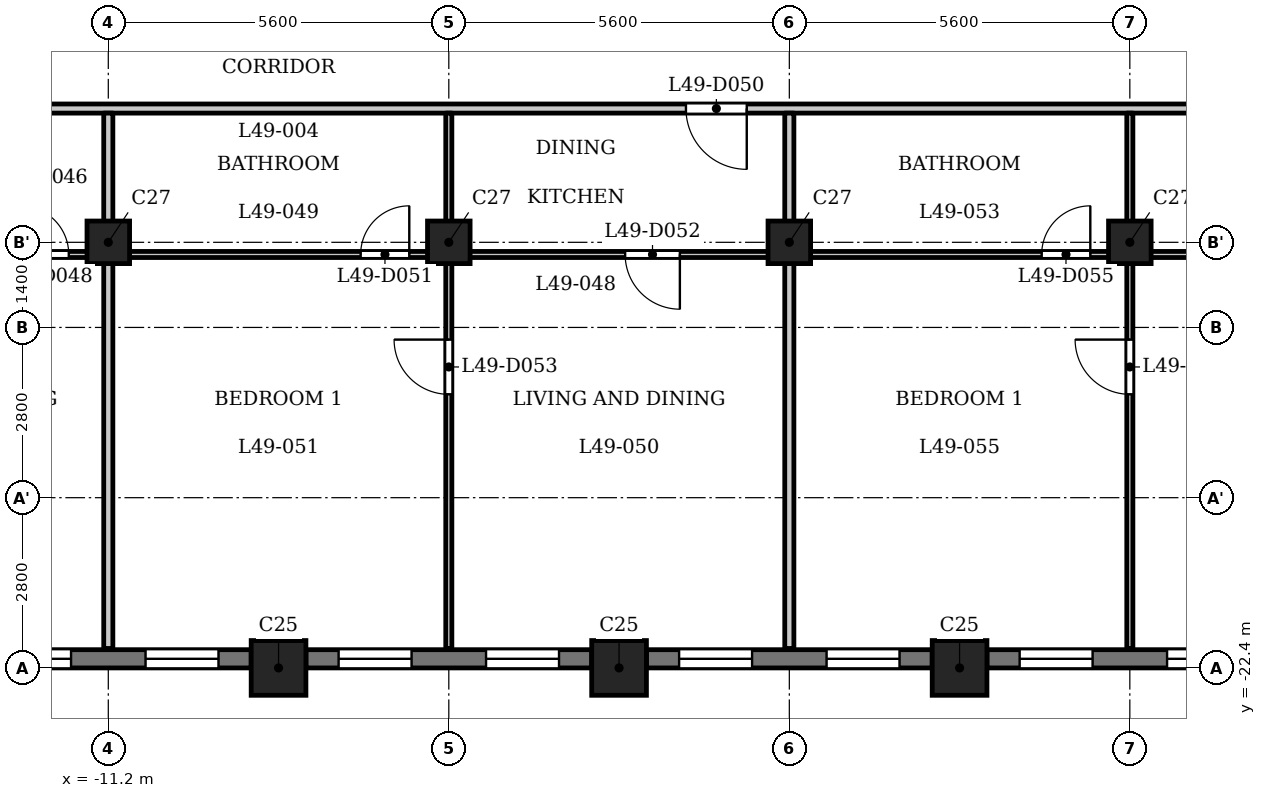
"""IFC4 building model, lengths in metres.
Left out: names, types, materials, properties, quantities, classifications, styles, units other than length and angle.
Written with IfcOpenShell. Run it as: python <this file> out.ifc"""

import sys

from ifc_helpers import new_model, si_unit, direction, frame, frame_2d, origin, origin_2d, place, context, subcontext, project, spatial, rectangle, extrude, element, fill, save


model = new_model("IFC4")
c1 = context("Model", 3, precision=1e-05, world=origin(), true_north=direction((0.0, 1.0)))
c2 = subcontext(c1, "Body", "Model", "MODEL_VIEW")
j1 = project(units=[si_unit("LENGTHUNIT", "METRE"), si_unit("PLANEANGLEUNIT", "RADIAN")], contexts=[c1])
p1 = place(None, origin())
s1 = spatial("IfcSite", under=j1, at=p1, CompositionType="ELEMENT")
p2 = place(p1, origin())
s2 = spatial("IfcBuilding", under=s1, at=p2, CompositionType="ELEMENT")
p3 = place(p2, frame((0.0, 0.0, 192.4)))
s3 = spatial("IfcBuildingStorey", under=s2, at=p3, CompositionType="ELEMENT", Elevation=192.4)
for number, where, z_axis, x_axis in (
    (1, (-8.4, -22.4, 0.0), (0.0, 0.0, 1.0), (1.0, 0.0, 0.0)),
    (2, (-2.8, -22.4, 0.0), (0.0, 0.0, 1.0), (1.0, 0.0, 0.0)),
    (3, (2.8, -22.4, 0.0), (0.0, 0.0, 1.0), (1.0, 0.0, 0.0)),
):
    element("IfcColumn", number, at=place(p3, frame(where, z_axis=z_axis, x_axis=x_axis)), inside=s3, PredefinedType="COLUMN", context=c2, shape_type="SweptSolid", body=[
        extrude(rectangle(XDim=0.9, YDim=0.9, at=origin_2d()), origin(), (0.0, 0.0, 1.0), 3.5),
    ])
for number, where, z_axis, x_axis in (
    (4, (-11.2, -15.4, 0.0), (0.0, 0.0, 1.0), (1.0, 0.0, 0.0)),
    (5, (-5.6, -15.4, 0.0), (0.0, 0.0, 1.0), (1.0, 0.0, 0.0)),
    (6, (0.0, -15.4, 0.0), (0.0, 0.0, 1.0), (1.0, 0.0, 0.0)),
    (7, (5.6, -15.4, 0.0), (0.0, 0.0, 1.0), (1.0, 0.0, 0.0)),
):
    element("IfcColumn", number, at=place(p3, frame(where, z_axis=z_axis, x_axis=x_axis)), inside=s3, PredefinedType="COLUMN", context=c2, shape_type="SweptSolid", body=[
        extrude(rectangle(XDim=0.7, YDim=0.7, at=origin_2d()), origin(), (0.0, 0.0, 1.0), 3.5),
    ])
p4 = place(p3, frame((-13.55, -22.25, 0.0), z_axis=(0.0, 0.0, 1.0), x_axis=(1.0, 0.0, 0.0)))
e8 = element("IfcWall", 8, at=p4, inside=s3, PredefinedType="SOLIDWALL", context=c2, shape_type="SweptSolid", body=[
    extrude(rectangle(XDim=4.7, YDim=0.3, at=frame_2d((2.35, 0.0))), origin(), (0.0, 0.0, 1.0), 2.5),
])
p5 = place(p4, frame((0.538, 0.0, 0.6)))
e9 = element("IfcOpeningElement", 9, at=p5, cuts=e8, PredefinedType="OPENING", context=c2, shape_type="SweptSolid", body=[
    extrude(rectangle(XDim=1.2, YDim=1.55, at=frame_2d((0.6, 0.775))), frame((0.0, 0.16, 0.0), z_axis=(0.0, -1.0, 0.0), x_axis=(1.0, 0.0, 0.0)), (0.0, 0.0, 1.0), 0.32),
])
p6 = place(p4, frame((2.962, 0.0, 0.6)))
e10 = element("IfcOpeningElement", 10, at=p6, cuts=e8, PredefinedType="OPENING", context=c2, shape_type="SweptSolid", body=[
    extrude(rectangle(XDim=1.2, YDim=1.55, at=frame_2d((0.6, 0.775))), frame((0.0, 0.16, 0.0), z_axis=(0.0, -1.0, 0.0), x_axis=(1.0, 0.0, 0.0)), (0.0, 0.0, 1.0), 0.32),
])
p7 = place(p3, frame((-7.95, -22.25, 0.0), z_axis=(0.0, 0.0, 1.0), x_axis=(1.0, 0.0, 0.0)))
e11 = element("IfcWall", 11, at=p7, inside=s3, PredefinedType="SOLIDWALL", context=c2, shape_type="SweptSolid", body=[
    extrude(rectangle(XDim=4.7, YDim=0.3, at=frame_2d((2.35, 0.0))), origin(), (0.0, 0.0, 1.0), 2.5),
])
p8 = place(p7, frame((0.538, 0.0, 0.6)))
e12 = element("IfcOpeningElement", 12, at=p8, cuts=e11, PredefinedType="OPENING", context=c2, shape_type="SweptSolid", body=[
    extrude(rectangle(XDim=1.2, YDim=1.55, at=frame_2d((0.6, 0.775))), frame((0.0, 0.16, 0.0), z_axis=(0.0, -1.0, 0.0), x_axis=(1.0, 0.0, 0.0)), (0.0, 0.0, 1.0), 0.32),
])
p9 = place(p7, frame((2.962, 0.0, 0.6)))
e13 = element("IfcOpeningElement", 13, at=p9, cuts=e11, PredefinedType="OPENING", context=c2, shape_type="SweptSolid", body=[
    extrude(rectangle(XDim=1.2, YDim=1.55, at=frame_2d((0.6, 0.775))), frame((0.0, 0.16, 0.0), z_axis=(0.0, -1.0, 0.0), x_axis=(1.0, 0.0, 0.0)), (0.0, 0.0, 1.0), 0.32),
])
p10 = place(p3, frame((-2.35, -22.25, 0.0), z_axis=(0.0, 0.0, 1.0), x_axis=(1.0, 0.0, 0.0)))
e14 = element("IfcWall", 14, at=p10, inside=s3, PredefinedType="SOLIDWALL", context=c2, shape_type="SweptSolid", body=[
    extrude(rectangle(XDim=4.7, YDim=0.3, at=frame_2d((2.35, 0.0))), origin(), (0.0, 0.0, 1.0), 2.5),
])
p11 = place(p10, frame((0.538, 0.0, 0.6)))
e15 = element("IfcOpeningElement", 15, at=p11, cuts=e14, PredefinedType="OPENING", context=c2, shape_type="SweptSolid", body=[
    extrude(rectangle(XDim=1.2, YDim=1.55, at=frame_2d((0.6, 0.775))), frame((0.0, 0.16, 0.0), z_axis=(0.0, -1.0, 0.0), x_axis=(1.0, 0.0, 0.0)), (0.0, 0.0, 1.0), 0.32),
])
p12 = place(p10, frame((2.962, 0.0, 0.6)))
e16 = element("IfcOpeningElement", 16, at=p12, cuts=e14, PredefinedType="OPENING", context=c2, shape_type="SweptSolid", body=[
    extrude(rectangle(XDim=1.2, YDim=1.55, at=frame_2d((0.6, 0.775))), frame((0.0, 0.16, 0.0), z_axis=(0.0, -1.0, 0.0), x_axis=(1.0, 0.0, 0.0)), (0.0, 0.0, 1.0), 0.32),
])
p13 = place(p3, frame((3.25, -22.25, 0.0), z_axis=(0.0, 0.0, 1.0), x_axis=(1.0, 0.0, 0.0)))
e17 = element("IfcWall", 17, at=p13, inside=s3, PredefinedType="SOLIDWALL", context=c2, shape_type="SweptSolid", body=[
    extrude(rectangle(XDim=4.7, YDim=0.3, at=frame_2d((2.35, 0.0))), origin(), (0.0, 0.0, 1.0), 2.5),
])
p14 = place(p13, frame((0.538, 0.0, 0.6)))
e18 = element("IfcOpeningElement", 18, at=p14, cuts=e17, PredefinedType="OPENING", context=c2, shape_type="SweptSolid", body=[
    extrude(rectangle(XDim=1.2, YDim=1.55, at=frame_2d((0.6, 0.775))), frame((0.0, 0.16, 0.0), z_axis=(0.0, -1.0, 0.0), x_axis=(1.0, 0.0, 0.0)), (0.0, 0.0, 1.0), 0.32),
])
p15 = place(p13, frame((2.962, 0.0, 0.6)))
e19 = element("IfcOpeningElement", 19, at=p15, cuts=e17, PredefinedType="OPENING", context=c2, shape_type="SweptSolid", body=[
    extrude(rectangle(XDim=1.2, YDim=1.55, at=frame_2d((0.6, 0.775))), frame((0.0, 0.16, 0.0), z_axis=(0.0, -1.0, 0.0), x_axis=(1.0, 0.0, 0.0)), (0.0, 0.0, 1.0), 0.32),
])
p16 = place(p3, frame((-16.725, -15.6, 0.0), z_axis=(0.0, 0.0, 1.0), x_axis=(1.0, 0.0, 0.0)))
e20 = element("IfcWall", 20, at=p16, inside=s3, PredefinedType="PARTITIONING", context=c2, shape_type="SweptSolid", body=[
    extrude(rectangle(XDim=33.45, YDim=0.1, at=frame_2d((16.725, 0.0))), origin(), (0.0, 0.0, 1.0), 3.2),
])
p17 = place(p16, frame((4.075, 0.0, 0.0)))
e21 = element("IfcOpeningElement", 21, at=p17, cuts=e20, PredefinedType="OPENING", context=c2, shape_type="SweptSolid", body=[
    extrude(rectangle(XDim=0.8, YDim=2.1, at=frame_2d((0.4, 1.05))), frame((0.0, 0.06, 0.0), z_axis=(0.0, -1.0, 0.0), x_axis=(1.0, 0.0, 0.0)), (0.0, 0.0, 1.0), 0.12),
])
p18 = place(p16, frame((1.825, 0.0, 0.0)))
e22 = element("IfcOpeningElement", 22, at=p18, cuts=e20, PredefinedType="OPENING", context=c2, shape_type="SweptSolid", body=[
    extrude(rectangle(XDim=0.9, YDim=2.1, at=frame_2d((0.45, 1.05))), frame((0.0, 0.06, 0.0), z_axis=(0.0, -1.0, 0.0), x_axis=(1.0, 0.0, 0.0)), (0.0, 0.0, 1.0), 0.12),
])
p19 = place(p16, frame((9.675, 0.0, 0.0)))
e23 = element("IfcOpeningElement", 23, at=p19, cuts=e20, PredefinedType="OPENING", context=c2, shape_type="SweptSolid", body=[
    extrude(rectangle(XDim=0.8, YDim=2.1, at=frame_2d((0.4, 1.05))), frame((0.0, 0.06, 0.0), z_axis=(0.0, -1.0, 0.0), x_axis=(1.0, 0.0, 0.0)), (0.0, 0.0, 1.0), 0.12),
])
p20 = place(p16, frame((14.025, 0.0, 0.0)))
e24 = element("IfcOpeningElement", 24, at=p20, cuts=e20, PredefinedType="OPENING", context=c2, shape_type="SweptSolid", body=[
    extrude(rectangle(XDim=0.9, YDim=2.1, at=frame_2d((0.45, 1.05))), frame((0.0, 0.06, 0.0), z_axis=(0.0, -1.0, 0.0), x_axis=(1.0, 0.0, 0.0)), (0.0, 0.0, 1.0), 0.12),
])
p21 = place(p16, frame((20.875, 0.0, 0.0)))
e25 = element("IfcOpeningElement", 25, at=p21, cuts=e20, PredefinedType="OPENING", context=c2, shape_type="SweptSolid", body=[
    extrude(rectangle(XDim=0.8, YDim=2.1, at=frame_2d((0.4, 1.05))), frame((0.0, 0.06, 0.0), z_axis=(0.0, -1.0, 0.0), x_axis=(1.0, 0.0, 0.0)), (0.0, 0.0, 1.0), 0.12),
])
p22 = place(p16, frame((25.225, 0.0, 0.0)))
e26 = element("IfcOpeningElement", 26, at=p22, cuts=e20, PredefinedType="OPENING", context=c2, shape_type="SweptSolid", body=[
    extrude(rectangle(XDim=0.9, YDim=2.1, at=frame_2d((0.45, 1.05))), frame((0.0, 0.06, 0.0), z_axis=(0.0, -1.0, 0.0), x_axis=(1.0, 0.0, 0.0)), (0.0, 0.0, 1.0), 0.12),
])
p23 = place(p16, frame((28.475, 0.0, 0.0)))
e27 = element("IfcOpeningElement", 27, at=p23, cuts=e20, PredefinedType="OPENING", context=c2, shape_type="SweptSolid", body=[
    extrude(rectangle(XDim=0.8, YDim=2.1, at=frame_2d((0.4, 1.05))), frame((0.0, 0.06, 0.0), z_axis=(0.0, -1.0, 0.0), x_axis=(1.0, 0.0, 0.0)), (0.0, 0.0, 1.0), 0.12),
])
p24 = place(p16, frame((30.675, 0.0, 0.0)))
e28 = element("IfcOpeningElement", 28, at=p24, cuts=e20, PredefinedType="OPENING", context=c2, shape_type="SweptSolid", body=[
    extrude(rectangle(XDim=0.9, YDim=2.1, at=frame_2d((0.45, 1.05))), frame((0.0, 0.06, 0.0), z_axis=(0.0, -1.0, 0.0), x_axis=(1.0, 0.0, 0.0)), (0.0, 0.0, 1.0), 0.12),
])
p25 = place(p3, frame((-17.4, -13.2, 0.0), z_axis=(0.0, 0.0, 1.0), x_axis=(1.0, 0.0, 0.0)))
e29 = element("IfcWall", 29, at=p25, inside=s3, PredefinedType="PARTITIONING", context=c2, shape_type="SweptSolid", body=[
    extrude(rectangle(XDim=34.8, YDim=0.15, at=frame_2d((17.4, 0.0))), origin(), (0.0, 0.0, 1.0), 3.2),
])
p26 = place(p25, frame((0.15, 0.0, 0.0)))
e30 = element("IfcOpeningElement", 30, at=p26, cuts=e29, PredefinedType="OPENING", context=c2, shape_type="SweptSolid", body=[
    extrude(rectangle(XDim=1.0, YDim=2.1, at=frame_2d((0.5, 1.05))), frame((0.0, 0.085, 0.0), z_axis=(0.0, -1.0, 0.0), x_axis=(1.0, 0.0, 0.0)), (0.0, 0.0, 1.0), 0.17),
])
p27 = place(p25, frame((33.55, 0.0, 0.0)))
e31 = element("IfcOpeningElement", 31, at=p27, cuts=e29, PredefinedType="OPENING", context=c2, shape_type="SweptSolid", body=[
    extrude(rectangle(XDim=1.0, YDim=2.1, at=frame_2d((0.5, 1.05))), frame((0.0, 0.085, 0.0), z_axis=(0.0, -1.0, 0.0), x_axis=(1.0, 0.0, 0.0)), (0.0, 0.0, 1.0), 0.17),
])
p28 = place(p25, frame((15.7, 0.0, 0.0)))
e32 = element("IfcOpeningElement", 32, at=p28, cuts=e29, PredefinedType="OPENING", context=c2, shape_type="SweptSolid", body=[
    extrude(rectangle(XDim=1.0, YDim=2.1, at=frame_2d((0.5, 1.05))), frame((0.0, 0.085, 0.0), z_axis=(0.0, -1.0, 0.0), x_axis=(1.0, 0.0, 0.0)), (0.0, 0.0, 1.0), 0.17),
])
p29 = place(p25, frame((26.9, 0.0, 0.0)))
e33 = element("IfcOpeningElement", 33, at=p29, cuts=e29, PredefinedType="OPENING", context=c2, shape_type="SweptSolid", body=[
    extrude(rectangle(XDim=1.0, YDim=2.1, at=frame_2d((0.5, 1.05))), frame((0.0, 0.085, 0.0), z_axis=(0.0, -1.0, 0.0), x_axis=(1.0, 0.0, 0.0)), (0.0, 0.0, 1.0), 0.17),
])
p30 = place(p3, frame((-11.2, -22.08, 0.0), z_axis=(0.0, 0.0, 1.0), x_axis=(0.0, 1.0, 0.0)))
e34 = element("IfcWall", 34, at=p30, inside=s3, PredefinedType="PARTITIONING", context=c2, shape_type="SweptSolid", body=[
    extrude(rectangle(XDim=6.43, YDim=0.15, at=frame_2d((3.215, 0.0))), origin(), (0.0, 0.0, 1.0), 3.2),
])
p31 = place(p3, frame((-11.2, -15.55, 0.0), z_axis=(0.0, 0.0, 1.0), x_axis=(0.0, 1.0, 0.0)))
e35 = element("IfcWall", 35, at=p31, inside=s3, PredefinedType="PARTITIONING", context=c2, shape_type="SweptSolid", body=[
    extrude(rectangle(XDim=2.275, YDim=0.15, at=frame_2d((1.138, 0.0))), origin(), (0.0, 0.0, 1.0), 3.2),
])
p32 = place(p3, frame((-5.6, -22.08, 0.0), z_axis=(0.0, 0.0, 1.0), x_axis=(0.0, 1.0, 0.0)))
e36 = element("IfcWall", 36, at=p32, inside=s3, PredefinedType="PARTITIONING", context=c2, shape_type="SweptSolid", body=[
    extrude(rectangle(XDim=6.43, YDim=0.1, at=frame_2d((3.215, 0.0))), origin(), (0.0, 0.0, 1.0), 3.2),
])
p33 = place(p32, frame((4.18, 0.0, 0.0)))
e37 = element("IfcOpeningElement", 37, at=p33, cuts=e36, PredefinedType="OPENING", context=c2, shape_type="SweptSolid", body=[
    extrude(rectangle(XDim=0.9, YDim=2.1, at=frame_2d((0.45, 1.05))), frame((0.0, 0.06, 0.0), z_axis=(0.0, -1.0, 0.0), x_axis=(1.0, 0.0, 0.0)), (0.0, 0.0, 1.0), 0.12),
])
p34 = place(p3, frame((-5.6, -15.55, 0.0), z_axis=(0.0, 0.0, 1.0), x_axis=(0.0, 1.0, 0.0)))
e38 = element("IfcWall", 38, at=p34, inside=s3, PredefinedType="PARTITIONING", context=c2, shape_type="SweptSolid", body=[
    extrude(rectangle(XDim=2.275, YDim=0.1, at=frame_2d((1.138, 0.0))), origin(), (0.0, 0.0, 1.0), 3.2),
])
p35 = place(p3, frame((0.0, -22.08, 0.0), z_axis=(0.0, 0.0, 1.0), x_axis=(0.0, 1.0, 0.0)))
e39 = element("IfcWall", 39, at=p35, inside=s3, PredefinedType="PARTITIONING", context=c2, shape_type="SweptSolid", body=[
    extrude(rectangle(XDim=6.43, YDim=0.15, at=frame_2d((3.215, 0.0))), origin(), (0.0, 0.0, 1.0), 3.2),
])
p36 = place(p3, frame((0.0, -15.55, 0.0), z_axis=(0.0, 0.0, 1.0), x_axis=(0.0, 1.0, 0.0)))
e40 = element("IfcWall", 40, at=p36, inside=s3, PredefinedType="PARTITIONING", context=c2, shape_type="SweptSolid", body=[
    extrude(rectangle(XDim=2.275, YDim=0.15, at=frame_2d((1.138, 0.0))), origin(), (0.0, 0.0, 1.0), 3.2),
])
p37 = place(p3, frame((5.6, -22.08, 0.0), z_axis=(0.0, 0.0, 1.0), x_axis=(0.0, 1.0, 0.0)))
e41 = element("IfcWall", 41, at=p37, inside=s3, PredefinedType="PARTITIONING", context=c2, shape_type="SweptSolid", body=[
    extrude(rectangle(XDim=6.43, YDim=0.1, at=frame_2d((3.215, 0.0))), origin(), (0.0, 0.0, 1.0), 3.2),
])
p38 = place(p37, frame((4.18, 0.0, 0.0)))
e42 = element("IfcOpeningElement", 42, at=p38, cuts=e41, PredefinedType="OPENING", context=c2, shape_type="SweptSolid", body=[
    extrude(rectangle(XDim=0.9, YDim=2.1, at=frame_2d((0.45, 1.05))), frame((0.0, 0.06, 0.0), z_axis=(0.0, -1.0, 0.0), x_axis=(1.0, 0.0, 0.0)), (0.0, 0.0, 1.0), 0.12),
])
p39 = place(p3, frame((5.6, -15.55, 0.0), z_axis=(0.0, 0.0, 1.0), x_axis=(0.0, 1.0, 0.0)))
e43 = element("IfcWall", 43, at=p39, inside=s3, PredefinedType="PARTITIONING", context=c2, shape_type="SweptSolid", body=[
    extrude(rectangle(XDim=2.275, YDim=0.1, at=frame_2d((1.138, 0.0))), origin(), (0.0, 0.0, 1.0), 3.2),
])
p40 = place(p17, origin())
e44 = element("IfcDoor", 44, at=p40, inside=s3, OperationType="SINGLE_SWING_RIGHT", PredefinedType="DOOR", context=c2, shape_type="SweptSolid", body=[
    extrude(rectangle(XDim=0.8, YDim=2.1, at=frame_2d((0.4, 1.05))), frame((0.0, 0.025, 0.0), z_axis=(0.0, -1.0, 0.0), x_axis=(1.0, 0.0, 0.0)), (0.0, 0.0, 1.0), 0.05),
])
fill(e21, e44)
p41 = place(p28, origin())
e45 = element("IfcDoor", 45, at=p41, inside=s3, OperationType="SINGLE_SWING_RIGHT", PredefinedType="DOOR", context=c2, shape_type="SweptSolid", body=[
    extrude(rectangle(XDim=1.0, YDim=2.1, at=frame_2d((0.5, 1.05))), frame((0.0, 0.025, 0.0), z_axis=(0.0, -1.0, 0.0), x_axis=(1.0, 0.0, 0.0)), (0.0, 0.0, 1.0), 0.05),
])
fill(e32, e45)
p42 = place(p19, origin())
e46 = element("IfcDoor", 46, at=p42, inside=s3, OperationType="SINGLE_SWING_LEFT", PredefinedType="DOOR", context=c2, shape_type="SweptSolid", body=[
    extrude(rectangle(XDim=0.8, YDim=2.1, at=frame_2d((0.4, 1.05))), frame((0.0, 0.025, 0.0), z_axis=(0.0, -1.0, 0.0), x_axis=(1.0, 0.0, 0.0)), (0.0, 0.0, 1.0), 0.05),
])
fill(e23, e46)
p43 = place(p20, origin())
e47 = element("IfcDoor", 47, at=p43, inside=s3, OperationType="SINGLE_SWING_RIGHT", PredefinedType="DOOR", context=c2, shape_type="SweptSolid", body=[
    extrude(rectangle(XDim=0.9, YDim=2.1, at=frame_2d((0.45, 1.05))), frame((0.0, 0.025, 0.0), z_axis=(0.0, -1.0, 0.0), x_axis=(1.0, 0.0, 0.0)), (0.0, 0.0, 1.0), 0.05),
])
fill(e24, e47)
p44 = place(p33, origin())
e48 = element("IfcDoor", 48, at=p44, inside=s3, OperationType="SINGLE_SWING_LEFT", PredefinedType="DOOR", context=c2, shape_type="SweptSolid", body=[
    extrude(rectangle(XDim=0.9, YDim=2.1, at=frame_2d((0.45, 1.05))), frame((0.0, 0.025, 0.0), z_axis=(0.0, -1.0, 0.0), x_axis=(1.0, 0.0, 0.0)), (0.0, 0.0, 1.0), 0.05),
])
fill(e37, e48)
p45 = place(p21, origin())
e49 = element("IfcDoor", 49, at=p45, inside=s3, OperationType="SINGLE_SWING_LEFT", PredefinedType="DOOR", context=c2, shape_type="SweptSolid", body=[
    extrude(rectangle(XDim=0.8, YDim=2.1, at=frame_2d((0.4, 1.05))), frame((0.0, 0.025, 0.0), z_axis=(0.0, -1.0, 0.0), x_axis=(1.0, 0.0, 0.0)), (0.0, 0.0, 1.0), 0.05),
])
fill(e25, e49)
p46 = place(p38, origin())
e50 = element("IfcDoor", 50, at=p46, inside=s3, OperationType="SINGLE_SWING_LEFT", PredefinedType="DOOR", context=c2, shape_type="SweptSolid", body=[
    extrude(rectangle(XDim=0.9, YDim=2.1, at=frame_2d((0.45, 1.05))), frame((0.0, 0.025, 0.0), z_axis=(0.0, -1.0, 0.0), x_axis=(1.0, 0.0, 0.0)), (0.0, 0.0, 1.0), 0.05),
])
fill(e42, e50)
p47 = place(p5, origin())
e51 = element("IfcWindow", 51, at=p47, inside=s3, PartitioningType="SINGLE_PANEL", PredefinedType="WINDOW", context=c2, shape_type="SweptSolid", body=[
    extrude(rectangle(XDim=1.2, YDim=1.55, at=frame_2d((0.6, 0.775))), frame((0.0, 0.03, 0.0), z_axis=(0.0, -1.0, 0.0), x_axis=(1.0, 0.0, 0.0)), (0.0, 0.0, 1.0), 0.06),
])
fill(e9, e51)
p48 = place(p6, origin())
e52 = element("IfcWindow", 52, at=p48, inside=s3, PartitioningType="SINGLE_PANEL", PredefinedType="WINDOW", context=c2, shape_type="SweptSolid", body=[
    extrude(rectangle(XDim=1.2, YDim=1.55, at=frame_2d((0.6, 0.775))), frame((0.0, 0.03, 0.0), z_axis=(0.0, -1.0, 0.0), x_axis=(1.0, 0.0, 0.0)), (0.0, 0.0, 1.0), 0.06),
])
fill(e10, e52)
p49 = place(p8, origin())
e53 = element("IfcWindow", 53, at=p49, inside=s3, PartitioningType="SINGLE_PANEL", PredefinedType="WINDOW", context=c2, shape_type="SweptSolid", body=[
    extrude(rectangle(XDim=1.2, YDim=1.55, at=frame_2d((0.6, 0.775))), frame((0.0, 0.03, 0.0), z_axis=(0.0, -1.0, 0.0), x_axis=(1.0, 0.0, 0.0)), (0.0, 0.0, 1.0), 0.06),
])
fill(e12, e53)
p50 = place(p9, origin())
e54 = element("IfcWindow", 54, at=p50, inside=s3, PartitioningType="SINGLE_PANEL", PredefinedType="WINDOW", context=c2, shape_type="SweptSolid", body=[
    extrude(rectangle(XDim=1.2, YDim=1.55, at=frame_2d((0.6, 0.775))), frame((0.0, 0.03, 0.0), z_axis=(0.0, -1.0, 0.0), x_axis=(1.0, 0.0, 0.0)), (0.0, 0.0, 1.0), 0.06),
])
fill(e13, e54)
p51 = place(p11, origin())
e55 = element("IfcWindow", 55, at=p51, inside=s3, PartitioningType="SINGLE_PANEL", PredefinedType="WINDOW", context=c2, shape_type="SweptSolid", body=[
    extrude(rectangle(XDim=1.2, YDim=1.55, at=frame_2d((0.6, 0.775))), frame((0.0, 0.03, 0.0), z_axis=(0.0, -1.0, 0.0), x_axis=(1.0, 0.0, 0.0)), (0.0, 0.0, 1.0), 0.06),
])
fill(e15, e55)
p52 = place(p12, origin())
e56 = element("IfcWindow", 56, at=p52, inside=s3, PartitioningType="SINGLE_PANEL", PredefinedType="WINDOW", context=c2, shape_type="SweptSolid", body=[
    extrude(rectangle(XDim=1.2, YDim=1.55, at=frame_2d((0.6, 0.775))), frame((0.0, 0.03, 0.0), z_axis=(0.0, -1.0, 0.0), x_axis=(1.0, 0.0, 0.0)), (0.0, 0.0, 1.0), 0.06),
])
fill(e16, e56)
p53 = place(p14, origin())
e57 = element("IfcWindow", 57, at=p53, inside=s3, PartitioningType="SINGLE_PANEL", PredefinedType="WINDOW", context=c2, shape_type="SweptSolid", body=[
    extrude(rectangle(XDim=1.2, YDim=1.55, at=frame_2d((0.6, 0.775))), frame((0.0, 0.03, 0.0), z_axis=(0.0, -1.0, 0.0), x_axis=(1.0, 0.0, 0.0)), (0.0, 0.0, 1.0), 0.06),
])
fill(e18, e57)
p54 = place(p15, origin())
e58 = element("IfcWindow", 58, at=p54, inside=s3, PartitioningType="SINGLE_PANEL", PredefinedType="WINDOW", context=c2, shape_type="SweptSolid", body=[
    extrude(rectangle(XDim=1.2, YDim=1.55, at=frame_2d((0.6, 0.775))), frame((0.0, 0.03, 0.0), z_axis=(0.0, -1.0, 0.0), x_axis=(1.0, 0.0, 0.0)), (0.0, 0.0, 1.0), 0.06),
])
fill(e19, e58)
save(model, sys.argv[1])
